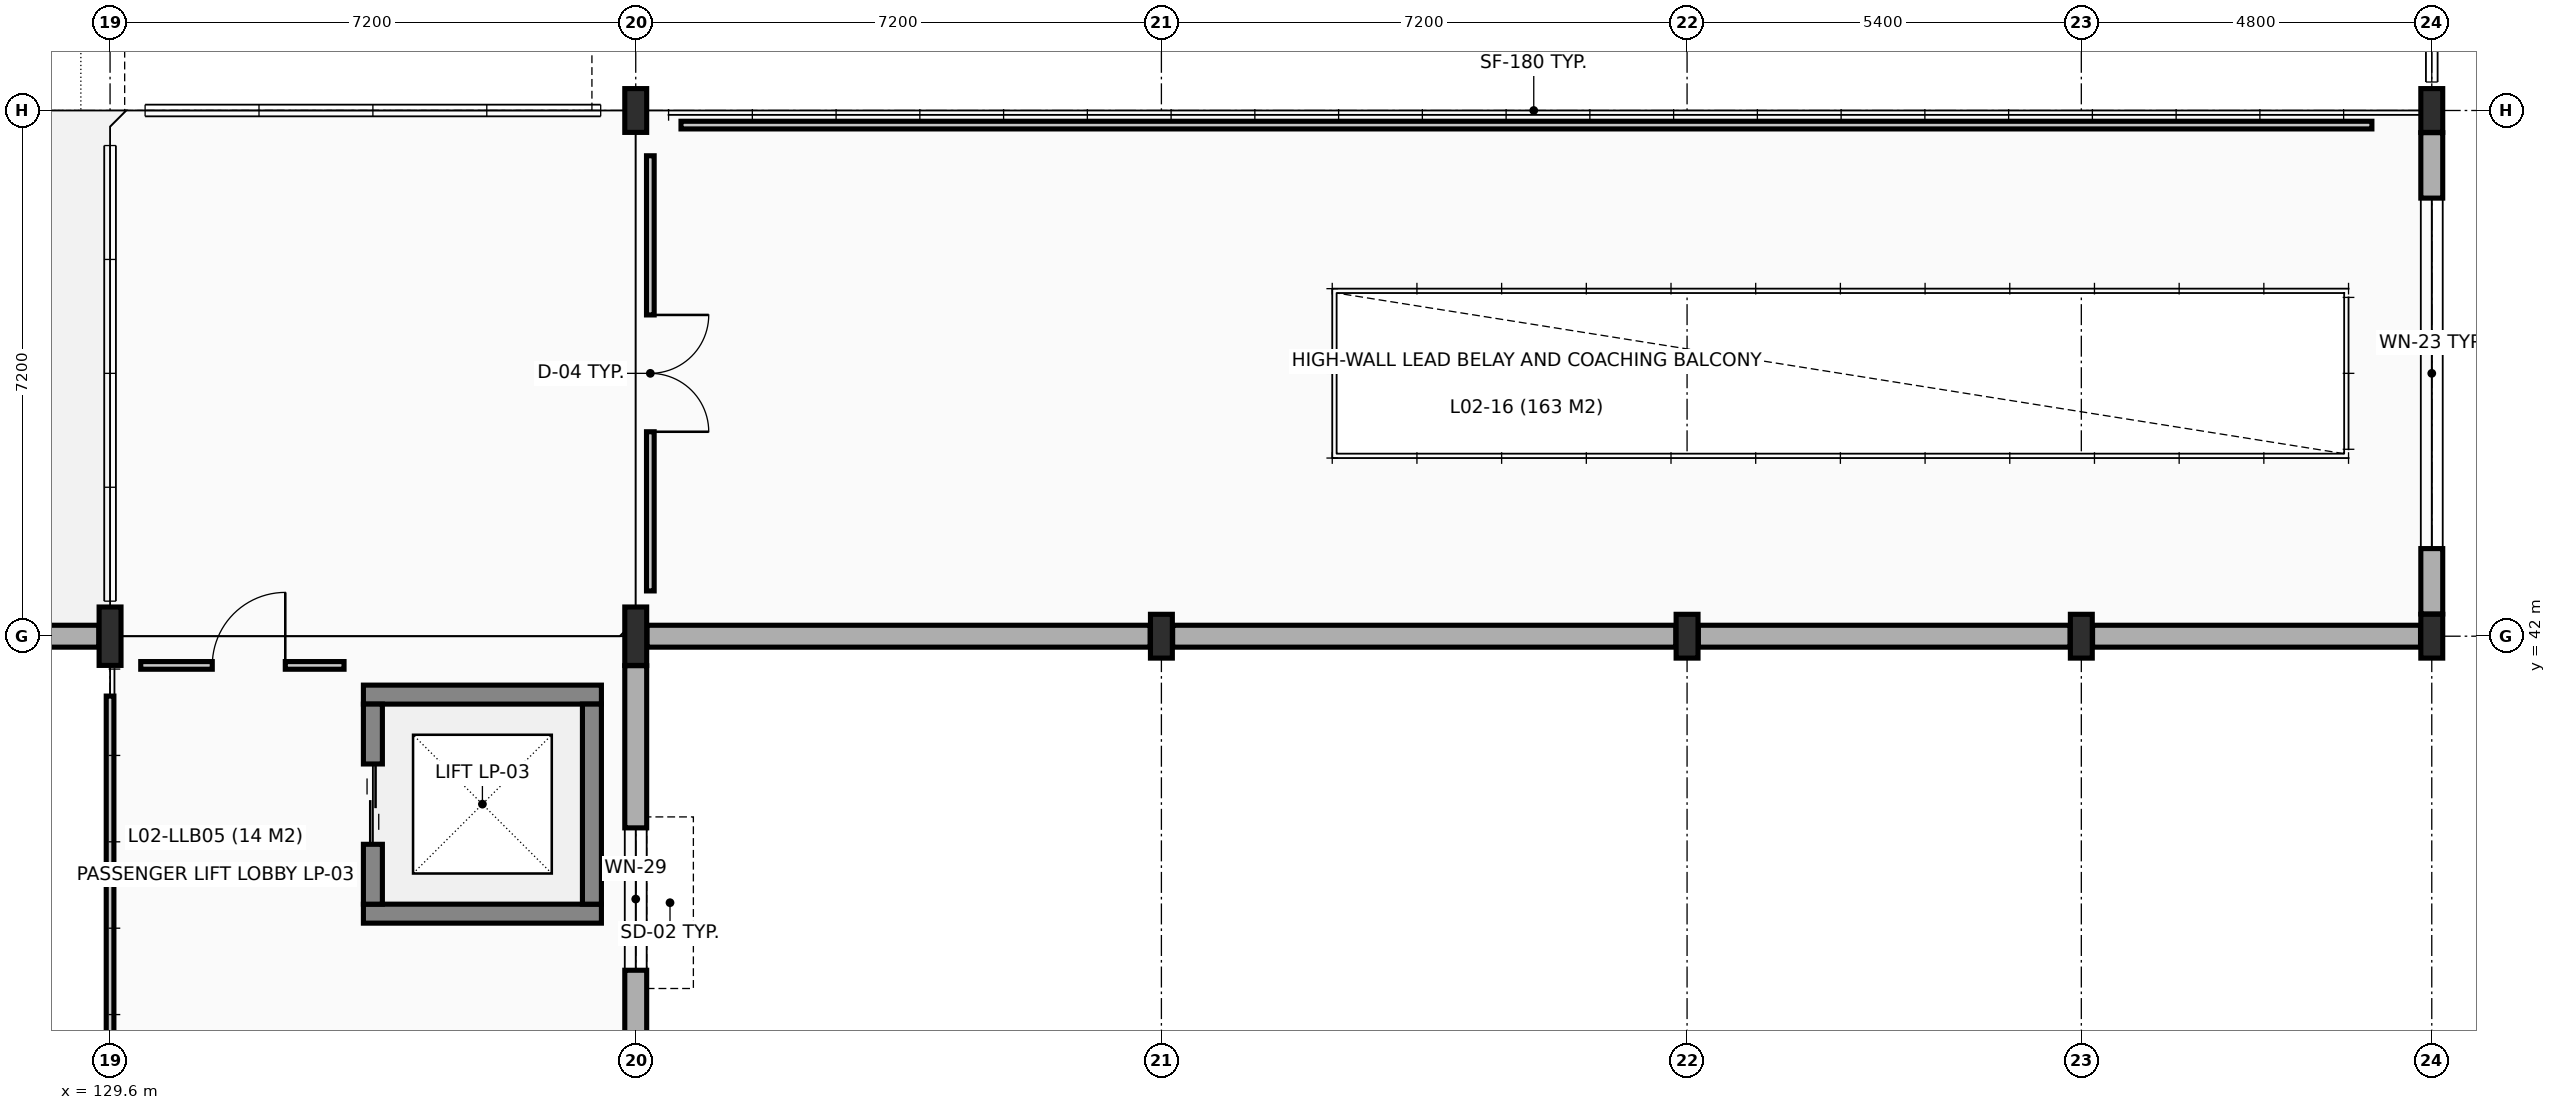
"""IFC4 building model, lengths in metres.
Left out: names, types, materials, properties, quantities, classifications, styles, units other than length and angle.
Written with IfcOpenShell. Run it as: python <this file> out.ifc"""

import sys

from ifc_helpers import new_model, si_unit, direction, frame, frame_2d, origin, origin_2d, place, context, subcontext, project, spatial, rectangle, i_section, extrude, element, fill, save


model = new_model("IFC4")
c1 = context("Model", 3, precision=1e-05, world=origin(), true_north=direction((0.0, 1.0)))
c2 = subcontext(c1, "Body", "Model", "MODEL_VIEW")
j1 = project(units=[si_unit("LENGTHUNIT", "METRE"), si_unit("PLANEANGLEUNIT", "RADIAN")], contexts=[c1])
p1 = place(None, origin())
s1 = spatial("IfcSite", under=j1, at=p1, CompositionType="ELEMENT")
p2 = place(p1, origin())
s2 = spatial("IfcBuilding", under=s1, at=p2, CompositionType="ELEMENT")
p3 = place(p2, frame((0.0, 0.0, 9.6)))
s3 = spatial("IfcBuildingStorey", under=s2, at=p3, CompositionType="ELEMENT", Elevation=9.6)
for number, where, z_axis, x_axis in (
    (1, (129.6, 42.0, 0.0), (0.0, 0.0, 1.0), (1.0, 0.0, 0.0)),
    (2, (136.8, 42.0, 0.0), (0.0, 0.0, 1.0), (1.0, 0.0, 0.0)),
):
    element("IfcColumn", number, at=place(p3, frame(where, z_axis=z_axis, x_axis=x_axis)), inside=s3, PredefinedType="COLUMN", context=c2, shape_type="SweptSolid", body=[
        extrude(i_section(OverallWidth=0.3, OverallDepth=0.8, WebThickness=0.018, FlangeThickness=0.033, at=origin_2d()), origin(), (0.0, 0.0, 1.0), 5.6),
    ])
for number, where, z_axis, x_axis in (
    (3, (136.8, 49.2, 0.0), (0.0, 0.0, 1.0), (1.0, 0.0, 0.0)),
    (4, (144.0, 42.0, 0.0), (0.0, 0.0, 1.0), (1.0, 0.0, 0.0)),
    (5, (151.2, 42.0, 0.0), (0.0, 0.0, 1.0), (1.0, 0.0, 0.0)),
    (6, (156.6, 42.0, 0.0), (0.0, 0.0, 1.0), (1.0, 0.0, 0.0)),
    (7, (161.4, 42.0, 0.0), (0.0, 0.0, 1.0), (1.0, 0.0, 0.0)),
    (8, (161.4, 49.2, 0.0), (0.0, 0.0, 1.0), (1.0, 0.0, 0.0)),
):
    element("IfcColumn", number, at=place(p3, frame(where, z_axis=z_axis, x_axis=x_axis)), inside=s3, PredefinedType="COLUMN", context=c2, shape_type="SweptSolid", body=[
        extrude(i_section(OverallWidth=0.3, OverallDepth=0.6, WebThickness=0.015, FlangeThickness=0.03, at=origin_2d()), origin(), (0.0, 0.0, 1.0), 4.8),
    ])
p4 = place(p3, frame((122.554, 42.0, 0.0), z_axis=(0.0, 0.0, 1.0), x_axis=(1.0, 0.0, 0.0)))
e9 = element("IfcWall", 9, at=p4, inside=s3, PredefinedType="SOLIDWALL", context=c2, shape_type="SweptSolid", body=[
    extrude(rectangle(XDim=6.892, YDim=0.3, at=frame_2d((3.446, 0.0))), origin(), (0.0, 0.0, 1.0), 4.145),
])
p5 = place(p3, frame((136.8, 35.104, 0.0), z_axis=(0.0, 0.0, 1.0), x_axis=(0.0, 1.0, 0.0)))
e10 = element("IfcWall", 10, at=p5, inside=s3, PredefinedType="SOLIDWALL", context=c2, shape_type="SweptSolid", body=[
    extrude(rectangle(XDim=6.492, YDim=0.3, at=frame_2d((3.246, 0.0))), origin(), (0.0, 0.0, 1.0), 4.045),
])
p6 = place(p5, frame((2.321, 0.0, 1.0)))
e11 = element("IfcOpeningElement", 11, at=p6, cuts=e10, PredefinedType="OPENING", context=c2, shape_type="SweptSolid", body=[
    extrude(rectangle(XDim=1.95, YDim=1.95, at=frame_2d((0.975, 0.975))), frame((0.0, 0.16, 0.0), z_axis=(0.0, -1.0, 0.0), x_axis=(1.0, 0.0, 0.0)), (0.0, 0.0, 1.0), 0.32),
])
for number, where, z_axis, x_axis in (
    (12, (136.954, 42.0, 0.0), (0.0, 0.0, 1.0), (1.0, 0.0, 0.0)),
    (13, (144.154, 42.0, 0.0), (0.0, 0.0, 1.0), (1.0, 0.0, 0.0)),
):
    element("IfcWall", number, at=place(p3, frame(where, z_axis=z_axis, x_axis=x_axis)), inside=s3, PredefinedType="SOLIDWALL", context=c2, shape_type="SweptSolid", body=[
        extrude(rectangle(XDim=6.892, YDim=0.3, at=frame_2d((3.446, 0.0))), origin(), (0.0, 0.0, 1.0), 4.385),
    ])
p7 = place(p3, frame((151.354, 42.0, 0.0), z_axis=(0.0, 0.0, 1.0), x_axis=(1.0, 0.0, 0.0)))
e14 = element("IfcWall", 14, at=p7, inside=s3, PredefinedType="SOLIDWALL", context=c2, shape_type="SweptSolid", body=[
    extrude(rectangle(XDim=5.092, YDim=0.3, at=frame_2d((2.546, 0.0))), origin(), (0.0, 0.0, 1.0), 4.385),
])
p8 = place(p3, frame((156.754, 42.0, 0.0), z_axis=(0.0, 0.0, 1.0), x_axis=(1.0, 0.0, 0.0)))
e15 = element("IfcWall", 15, at=p8, inside=s3, PredefinedType="SOLIDWALL", context=c2, shape_type="SweptSolid", body=[
    extrude(rectangle(XDim=4.492, YDim=0.3, at=frame_2d((2.246, 0.0))), origin(), (0.0, 0.0, 1.0), 4.385),
])
p9 = place(p3, frame((161.4, 42.304, 0.0), z_axis=(0.0, 0.0, 1.0), x_axis=(0.0, 1.0, 0.0)))
e16 = element("IfcWall", 16, at=p9, inside=s3, PredefinedType="SOLIDWALL", context=c2, shape_type="SweptSolid", body=[
    extrude(rectangle(XDim=6.592, YDim=0.3, at=frame_2d((3.296, 0.0))), origin(), (0.0, 0.0, 1.0), 4.385),
])
p10 = place(p9, frame((0.896, 0.0, 1.0)))
e17 = element("IfcOpeningElement", 17, at=p10, cuts=e16, PredefinedType="OPENING", context=c2, shape_type="SweptSolid", body=[
    extrude(rectangle(XDim=4.8, YDim=1.5, at=frame_2d((2.4, 0.75))), frame((0.0, 0.16, 0.0), z_axis=(0.0, -1.0, 0.0), x_axis=(1.0, 0.0, 0.0)), (0.0, 0.0, 1.0), 0.32),
])
for number, where, z_axis, x_axis in (
    (18, (133.07, 38.2, 0.0), (0.0, 0.0, 1.0), (1.0, 0.0, 0.0)),
    (19, (133.07, 41.2, 0.0), (0.0, 0.0, 1.0), (1.0, 0.0, 0.0)),
):
    element("IfcWall", number, at=place(p3, frame(where, z_axis=z_axis, x_axis=x_axis)), inside=s3, PredefinedType="SHEAR", context=c2, shape_type="SweptSolid", body=[
        extrude(rectangle(XDim=3.26, YDim=0.26, at=frame_2d((1.63, 0.0))), origin(), (0.0, 0.0, 1.0), 4.56),
    ])
p11 = place(p3, frame((133.2, 38.33, 0.0), z_axis=(0.0, 0.0, 1.0), x_axis=(0.0, 1.0, 0.0)))
e20 = element("IfcWall", 20, at=p11, inside=s3, PredefinedType="SHEAR", context=c2, shape_type="SweptSolid", body=[
    extrude(rectangle(XDim=2.74, YDim=0.26, at=frame_2d((1.37, 0.0))), origin(), (0.0, 0.0, 1.0), 4.56),
])
p12 = place(p11, frame((0.82, 0.0, 0.0)))
e21 = element("IfcOpeningElement", 21, at=p12, cuts=e20, PredefinedType="OPENING", context=c2, shape_type="SweptSolid", body=[
    extrude(rectangle(XDim=1.1, YDim=2.15, at=frame_2d((0.55, 1.075))), frame((0.0, 0.14, 0.0), z_axis=(0.0, -1.0, 0.0), x_axis=(1.0, 0.0, 0.0)), (0.0, 0.0, 1.0), 0.28),
])
p13 = place(p3, frame((136.2, 38.33, 0.0), z_axis=(0.0, 0.0, 1.0), x_axis=(0.0, 1.0, 0.0)))
e22 = element("IfcWall", 22, at=p13, inside=s3, PredefinedType="SHEAR", context=c2, shape_type="SweptSolid", body=[
    extrude(rectangle(XDim=2.74, YDim=0.26, at=frame_2d((1.37, 0.0))), origin(), (0.0, 0.0, 1.0), 4.56),
])
p14 = place(p3, frame((130.02, 41.6, 0.0), z_axis=(0.0, 0.0, 1.0), x_axis=(1.0, 0.0, 0.0)))
e23 = element("IfcWall", 23, at=p14, inside=s3, PredefinedType="PARTITIONING", context=c2, shape_type="SweptSolid", body=[
    extrude(rectangle(XDim=2.785, YDim=0.105, at=frame_2d((1.392, 0.0))), origin(), (0.0, 0.0, 1.0), 4.545),
])
p15 = place(p14, frame((0.98, 0.0, 0.0)))
e24 = element("IfcOpeningElement", 24, at=p15, cuts=e23, PredefinedType="OPENING", context=c2, shape_type="SweptSolid", body=[
    extrude(rectangle(XDim=1.0, YDim=2.1, at=frame_2d((0.5, 1.05))), frame((0.0, 0.062, 0.0), z_axis=(0.0, -1.0, 0.0), x_axis=(1.0, 0.0, 0.0)), (0.0, 0.0, 1.0), 0.125),
])
p16 = place(p3, frame((129.6, 33.62, 0.0), z_axis=(0.0, 0.0, 1.0), x_axis=(0.0, 1.0, 0.0)))
e25 = element("IfcWall", 25, at=p16, inside=s3, PredefinedType="PARTITIONING", context=c2, shape_type="SweptSolid", body=[
    extrude(rectangle(XDim=7.56, YDim=0.105, at=frame_2d((3.78, 0.0))), origin(), (0.0, 0.0, 1.0), 4.545),
])
p17 = place(p3, frame((137.42, 49.0, 0.0), z_axis=(0.0, 0.0, 1.0), x_axis=(1.0, 0.0, 0.0)))
e26 = element("IfcWall", 26, at=p17, inside=s3, PredefinedType="PARTITIONING", context=c2, shape_type="SweptSolid", body=[
    extrude(rectangle(XDim=23.16, YDim=0.105, at=frame_2d((11.58, 0.0))), origin(), (0.0, 0.0, 1.0), 4.545),
])
p18 = place(p3, frame((137.0, 42.62, 0.0), z_axis=(0.0, 0.0, 1.0), x_axis=(0.0, 1.0, 0.0)))
e27 = element("IfcWall", 27, at=p18, inside=s3, PredefinedType="PARTITIONING", context=c2, shape_type="SweptSolid", body=[
    extrude(rectangle(XDim=5.96, YDim=0.105, at=frame_2d((2.98, 0.0))), origin(), (0.0, 0.0, 1.0), 4.04),
])
p19 = place(p18, frame((2.18, 0.0, 0.0)))
e28 = element("IfcOpeningElement", 28, at=p19, cuts=e27, PredefinedType="OPENING", context=c2, shape_type="SweptSolid", body=[
    extrude(rectangle(XDim=1.6, YDim=2.2, at=frame_2d((0.8, 1.1))), frame((0.0, 0.062, 0.0), z_axis=(0.0, -1.0, 0.0), x_axis=(1.0, 0.0, 0.0)), (0.0, 0.0, 1.0), 0.125),
])
p20 = place(p6, origin())
e29 = element("IfcWindow", 29, at=p20, inside=s3, PartitioningType="SINGLE_PANEL", PredefinedType="WINDOW", context=c2, shape_type="SweptSolid", body=[
    extrude(rectangle(XDim=1.95, YDim=1.95, at=frame_2d((0.975, 0.975))), frame((0.0, 0.03, 0.0), z_axis=(0.0, -1.0, 0.0), x_axis=(1.0, 0.0, 0.0)), (0.0, 0.0, 1.0), 0.06),
])
fill(e11, e29)
p21 = place(p10, origin())
e30 = element("IfcWindow", 30, at=p21, inside=s3, PartitioningType="SINGLE_PANEL", PredefinedType="WINDOW", context=c2, shape_type="SweptSolid", body=[
    extrude(rectangle(XDim=4.8, YDim=1.5, at=frame_2d((2.4, 0.75))), frame((0.0, 0.03, 0.0), z_axis=(0.0, -1.0, 0.0), x_axis=(1.0, 0.0, 0.0)), (0.0, 0.0, 1.0), 0.06),
])
fill(e17, e30)
p22 = place(p12, origin())
e31 = element("IfcDoor", 31, at=p22, inside=s3, OperationType="DOUBLE_DOOR_SLIDING", PredefinedType="DOOR", context=c2, shape_type="SweptSolid", body=[
    extrude(rectangle(XDim=1.1, YDim=2.15, at=frame_2d((0.55, 1.075))), frame((0.0, 0.025, 0.0), z_axis=(0.0, -1.0, 0.0), x_axis=(1.0, 0.0, 0.0)), (0.0, 0.0, 1.0), 0.05),
])
fill(e21, e31)
p23 = place(p15, frame((1.0, 0.0, 0.0), z_axis=(0.0, 0.0, 1.0), x_axis=(-1.0, 0.0, 0.0)))
e32 = element("IfcDoor", 32, at=p23, inside=s3, OperationType="SINGLE_SWING_LEFT", PredefinedType="DOOR", context=c2, shape_type="SweptSolid", body=[
    extrude(rectangle(XDim=1.0, YDim=2.1, at=frame_2d((0.5, 1.05))), frame((0.0, 0.025, 0.0), z_axis=(0.0, -1.0, 0.0), x_axis=(1.0, 0.0, 0.0)), (0.0, 0.0, 1.0), 0.05),
])
fill(e24, e32)
p24 = place(p19, frame((1.6, 0.0, 0.0), z_axis=(0.0, 0.0, 1.0), x_axis=(-1.0, 0.0, 0.0)))
e33 = element("IfcDoor", 33, at=p24, inside=s3, OperationType="DOUBLE_DOOR_SINGLE_SWING", PredefinedType="DOOR", context=c2, shape_type="SweptSolid", body=[
    extrude(rectangle(XDim=1.6, YDim=2.2, at=frame_2d((0.8, 1.1))), frame((0.0, 0.025, 0.0), z_axis=(0.0, -1.0, 0.0), x_axis=(1.0, 0.0, 0.0)), (0.0, 0.0, 1.0), 0.05),
])
fill(e28, e33)
save(model, sys.argv[1])
